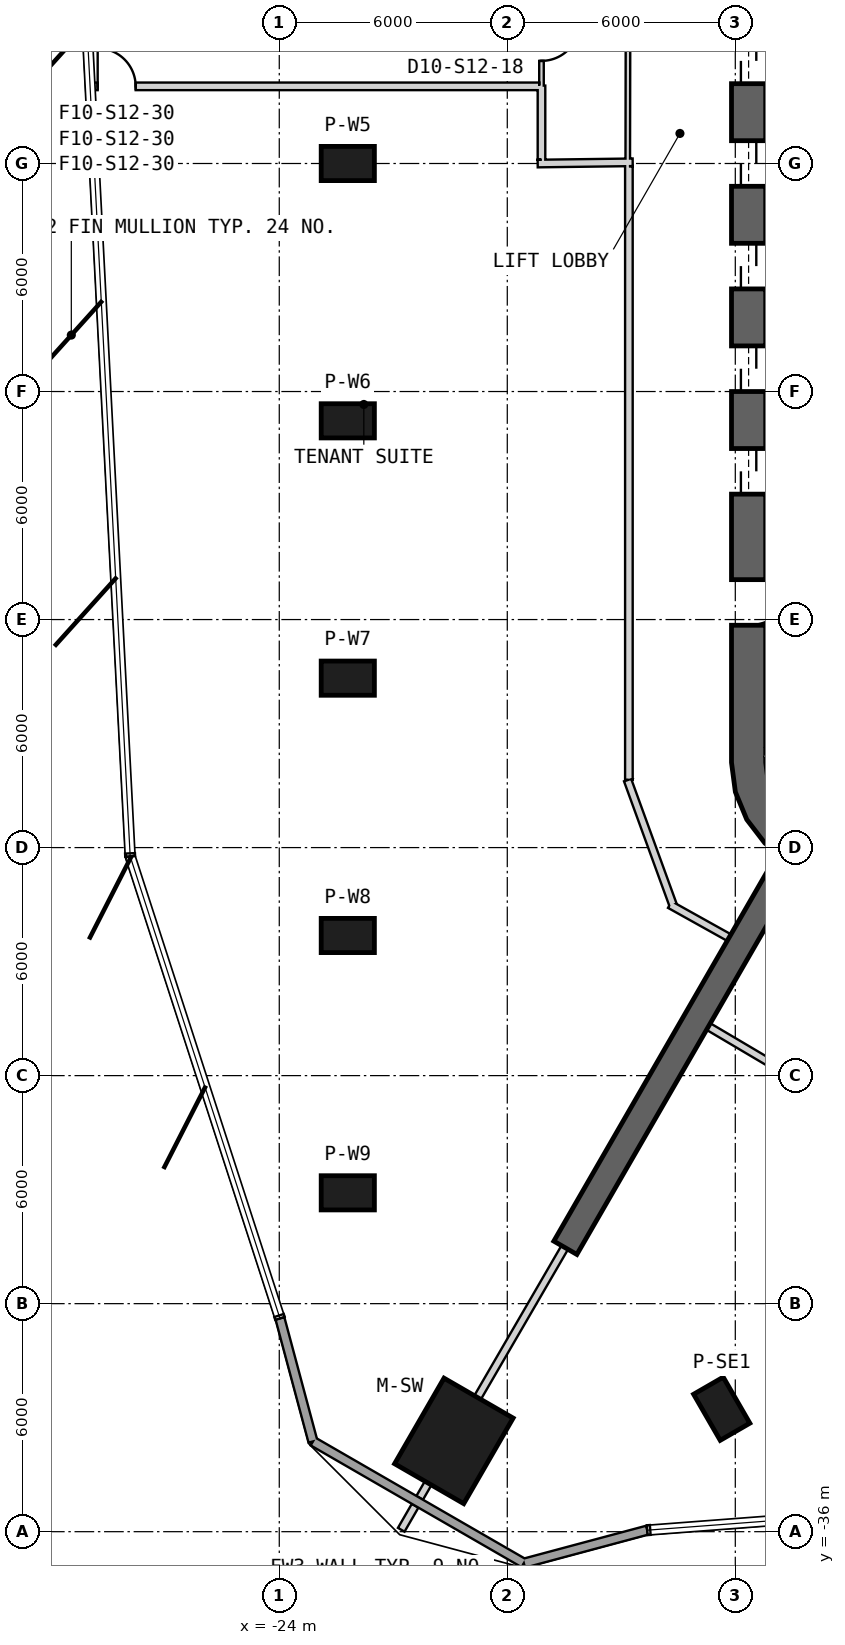
"""IFC4 building model, lengths in metres.
Left out: names, types, materials, properties, quantities, classifications, styles, units other than length and angle.
Written with IfcOpenShell. Run it as: python <this file> out.ifc"""

import sys

from ifc_helpers import new_model, si_unit, direction, frame, frame_2d, origin, origin_2d, place, context, subcontext, project, spatial, polyline, rectangle, outline, extrude, element, fill, save


model = new_model("IFC4")
c1 = context("Model", 3, precision=1e-05, world=origin(), true_north=direction((0.0, 1.0)))
c2 = subcontext(c1, "Body", "Model", "MODEL_VIEW")
j1 = project(units=[si_unit("LENGTHUNIT", "METRE"), si_unit("PLANEANGLEUNIT", "RADIAN")], contexts=[c1])
p1 = place(None, origin())
s1 = spatial("IfcSite", under=j1, at=p1, CompositionType="ELEMENT")
p2 = place(p1, origin())
s2 = spatial("IfcBuilding", under=s1, at=p2, CompositionType="ELEMENT")
p3 = place(p2, frame((0.0, 0.0, 205.2)))
s3 = spatial("IfcBuildingStorey", under=s2, at=p3, CompositionType="ELEMENT", Elevation=205.2)
p4 = place(p3, frame((-19.406, -33.611, 0.0), z_axis=(0.0, 0.0, 1.0), x_axis=(-0.5, -0.866025403784, 0.0)))
e1 = element("IfcColumn", 1, at=p4, inside=s3, PredefinedType="COLUMN", context=c2, shape_type="SweptSolid", body=[
    extrude(rectangle(XDim=2.6, YDim=2.1, at=origin_2d()), origin(), (0.0, 0.0, 1.0), 4.0),
])
for number, where, z_axis, x_axis in (
    (2, (-22.197, 0.0, 0.0), (0.0, 0.0, 1.0), (-1.0, 0.0, 0.0)),
    (3, (-22.197, -6.771, 0.0), (0.0, 0.0, 1.0), (-1.0, 0.0, 0.0)),
    (4, (-22.197, -13.542, 0.0), (0.0, 0.0, 1.0), (-1.0, 0.0, 0.0)),
    (5, (-22.197, -20.313, 0.0), (0.0, 0.0, 1.0), (-1.0, 0.0, 0.0)),
    (6, (-22.197, -27.084, 0.0), (0.0, 0.0, 1.0), (-1.0, 0.0, 0.0)),
    (7, (-12.357, -32.765, 0.0), (0.0, 0.0, 1.0), (0.5, -0.866, 0.0)),
):
    element("IfcColumn", number, at=place(p3, frame(where, z_axis=z_axis, x_axis=x_axis)), inside=s3, PredefinedType="COLUMN", context=c2, shape_type="SweptSolid", body=[
        extrude(rectangle(XDim=1.4, YDim=0.9, at=origin_2d()), origin(), (0.0, 0.0, 1.0), 4.0),
    ])
p5 = place(p3, frame((-11.65, 15.762, 0.0), z_axis=(0.0, 0.0, 1.0), x_axis=(0.0, -1.0, 0.0)))
e8 = element("IfcWall", 8, at=p5, inside=s3, PredefinedType="SHEAR", context=c2, shape_type="SweptSolid", body=[
    extrude(rectangle(XDim=31.523, YDim=0.9, at=frame_2d((15.762, 0.0))), origin(), (0.0, 0.0, 1.0), 4.0),
])
p6 = place(p5, frame((7.062, 0.0, 0.0)))
e9 = element("IfcOpeningElement", 9, at=p6, cuts=e8, PredefinedType="OPENING", context=c2, shape_type="SweptSolid", body=[
    extrude(rectangle(XDim=1.2, YDim=2.4, at=frame_2d((0.6, 1.2))), frame((0.0, 0.46, 0.0), z_axis=(0.0, -1.0, 0.0), x_axis=(1.0, 0.0, 0.0)), (0.0, 0.0, 1.0), 0.92),
])
p7 = place(p5, frame((9.762, 0.0, 0.0)))
e10 = element("IfcOpeningElement", 10, at=p7, cuts=e8, PredefinedType="OPENING", context=c2, shape_type="SweptSolid", body=[
    extrude(rectangle(XDim=1.2, YDim=2.4, at=frame_2d((0.6, 1.2))), frame((0.0, 0.46, 0.0), z_axis=(0.0, -1.0, 0.0), x_axis=(1.0, 0.0, 0.0)), (0.0, 0.0, 1.0), 0.92),
])
p8 = place(p5, frame((12.462, 0.0, 0.0)))
e11 = element("IfcOpeningElement", 11, at=p8, cuts=e8, PredefinedType="OPENING", context=c2, shape_type="SweptSolid", body=[
    extrude(rectangle(XDim=1.2, YDim=2.4, at=frame_2d((0.6, 1.2))), frame((0.0, 0.46, 0.0), z_axis=(0.0, -1.0, 0.0), x_axis=(1.0, 0.0, 0.0)), (0.0, 0.0, 1.0), 0.92),
])
p9 = place(p5, frame((15.162, 0.0, 0.0)))
e12 = element("IfcOpeningElement", 12, at=p9, cuts=e8, PredefinedType="OPENING", context=c2, shape_type="SweptSolid", body=[
    extrude(rectangle(XDim=1.2, YDim=2.4, at=frame_2d((0.6, 1.2))), frame((0.0, 0.46, 0.0), z_axis=(0.0, -1.0, 0.0), x_axis=(1.0, 0.0, 0.0)), (0.0, 0.0, 1.0), 0.92),
])
p10 = place(p5, frame((17.862, 0.0, 0.0)))
e13 = element("IfcOpeningElement", 13, at=p10, cuts=e8, PredefinedType="OPENING", context=c2, shape_type="SweptSolid", body=[
    extrude(rectangle(XDim=1.2, YDim=2.4, at=frame_2d((0.6, 1.2))), frame((0.0, 0.46, 0.0), z_axis=(0.0, -1.0, 0.0), x_axis=(1.0, 0.0, 0.0)), (0.0, 0.0, 1.0), 0.92),
])
p11 = place(p5, frame((20.562, 0.0, 0.0)))
e14 = element("IfcOpeningElement", 14, at=p11, cuts=e8, PredefinedType="OPENING", context=c2, shape_type="SweptSolid", body=[
    extrude(rectangle(XDim=1.2, YDim=2.4, at=frame_2d((0.6, 1.2))), frame((0.0, 0.46, 0.0), z_axis=(0.0, -1.0, 0.0), x_axis=(1.0, 0.0, 0.0)), (0.0, 0.0, 1.0), 0.92),
])
p12 = place(p5, frame((23.262, 0.0, 0.0)))
e15 = element("IfcOpeningElement", 15, at=p12, cuts=e8, PredefinedType="OPENING", context=c2, shape_type="SweptSolid", body=[
    extrude(rectangle(XDim=1.2, YDim=2.4, at=frame_2d((0.6, 1.2))), frame((0.0, 0.46, 0.0), z_axis=(0.0, -1.0, 0.0), x_axis=(1.0, 0.0, 0.0)), (0.0, 0.0, 1.0), 0.92),
])
p13 = place(p5, frame((3.612, 0.0, 0.0)))
e16 = element("IfcOpeningElement", 16, at=p13, cuts=e8, PredefinedType="OPENING", context=c2, shape_type="SweptSolid", body=[
    extrude(rectangle(XDim=1.2, YDim=2.4, at=frame_2d((0.6, 1.2))), frame((0.0, 0.46, 0.0), z_axis=(0.0, -1.0, 0.0), x_axis=(1.0, 0.0, 0.0)), (0.0, 0.0, 1.0), 0.92),
])
p14 = place(p5, frame((26.712, 0.0, 0.0)))
e17 = element("IfcOpeningElement", 17, at=p14, cuts=e8, PredefinedType="OPENING", context=c2, shape_type="SweptSolid", body=[
    extrude(rectangle(XDim=1.2, YDim=2.4, at=frame_2d((0.6, 1.2))), frame((0.0, 0.46, 0.0), z_axis=(0.0, -1.0, 0.0), x_axis=(1.0, 0.0, 0.0)), (0.0, 0.0, 1.0), 0.92),
])
p15 = place(p3, origin())
e18 = element("IfcWall", 18, at=p15, inside=s3, PredefinedType="SHEAR", context=c2, shape_type="SweptSolid", body=[
    extrude(outline(polyline([(-12.1, -15.762), (-11.998, -16.538), (-11.698, -17.262), (-11.221, -17.883), (-10.6, -18.36), (-9.876, -18.659), (-9.1, -18.762), (-8.323, -18.659), (-7.6, -18.36), (-8.05, -17.58), (-8.556, -17.79), (-9.1, -17.862), (-9.644, -17.79), (-10.15, -17.58), (-10.585, -17.247), (-10.919, -16.812), (-11.128, -16.305), (-11.2, -15.762), (-12.1, -15.762)])), origin(), (0.0, 0.0, 1.0), 4.0),
])
p16 = place(p3, frame((-10.575, -18.316, 0.0), z_axis=(0.0, 0.0, 1.0), x_axis=(-0.499999598486, -0.866025635599, 0.0)))
e19 = element("IfcWall", 19, at=p16, inside=s3, PredefinedType="SHEAR", context=c2, shape_type="SweptSolid", body=[
    extrude(rectangle(XDim=11.794, YDim=0.7, at=frame_2d((5.897, 0.0))), origin(), (0.0, 0.0, 1.0), 4.0),
])
p17 = place(p3, frame((-23.982, -30.388, 0.0), z_axis=(0.0, 0.0, 1.0), x_axis=(0.258863474337, -0.965913920416, 0.0)))
e20 = element("IfcWall", 20, at=p17, inside=s3, PredefinedType="SOLIDWALL", context=c2, shape_type="SweptSolid", body=[
    extrude(rectangle(XDim=3.353, YDim=0.24, at=frame_2d((1.676, 0.0))), origin(), (0.0, 0.0, 1.0), 3.7),
])
p18 = place(p3, frame((-23.114, -33.626, 0.0), z_axis=(0.0, 0.0, 1.0), x_axis=(0.86602381473, -0.500002752313, 0.0)))
e21 = element("IfcWall", 21, at=p18, inside=s3, PredefinedType="SOLIDWALL", context=c2, shape_type="SweptSolid", body=[
    extrude(rectangle(XDim=6.409, YDim=0.24, at=frame_2d((3.204, 0.0))), origin(), (0.0, 0.0, 1.0), 3.7),
])
p19 = place(p3, frame((-17.564, -36.831, 0.0), z_axis=(0.0, 0.0, 1.0), x_axis=(0.965919514081, 0.258842601434, 0.0)))
e22 = element("IfcWall", 22, at=p19, inside=s3, PredefinedType="SOLIDWALL", context=c2, shape_type="SweptSolid", body=[
    extrude(rectangle(XDim=3.361, YDim=0.24, at=frame_2d((1.68, 0.0))), origin(), (0.0, 0.0, 1.0), 3.7),
])
p20 = place(p3, frame((-11.282, -15.541, -0.3), z_axis=(0.0, 0.0, 1.0), x_axis=(0.866000483506, -0.500043160704, 0.0)))
e23 = element("IfcWall", 23, at=p20, inside=s3, PredefinedType="SHEAR", context=c2, shape_type="SweptSolid", body=[
    extrude(rectangle(XDim=3.8, YDim=0.2, at=frame_2d((1.9, 0.0))), origin(), (0.0, 0.0, 1.0), 4.0),
])
p21 = place(p3, frame((-7.196, -8.663, -0.3), z_axis=(0.0, 0.0, 1.0), x_axis=(-0.499997992926, -0.866026562566, 0.0)))
e24 = element("IfcWall", 24, at=p21, inside=s3, PredefinedType="SHEAR", context=c2, shape_type="SweptSolid", body=[
    extrude(rectangle(XDim=7.9, YDim=0.2, at=frame_2d((3.95, 0.0))), origin(), (0.0, 0.0, 1.0), 4.0),
])
p22 = place(p3, frame((-14.8, 16.257, 0.0), z_axis=(0.0, 0.0, 1.0), x_axis=(-0.001847148781, -0.999998294019, 0.0)))
e25 = element("IfcWall", 25, at=p22, inside=s3, PredefinedType="PARTITIONING", context=c2, shape_type="SweptSolid", body=[
    extrude(rectangle(XDim=16.257, YDim=0.12, at=frame_2d((8.128, 0.0))), origin(), (0.0, 0.0, 1.0), 2.88),
])
p23 = place(p22, frame((7.629, 0.0, 0.0)))
e26 = element("IfcOpeningElement", 26, at=p23, cuts=e25, PredefinedType="OPENING", context=c2, shape_type="SweptSolid", body=[
    extrude(rectangle(XDim=1.0, YDim=2.1, at=frame_2d((0.5, 1.05))), frame((0.0, 0.07, 0.0), z_axis=(0.0, -1.0, 0.0), x_axis=(1.0, 0.0, 0.0)), (0.0, 0.0, 1.0), 0.14),
])
p24 = place(p3, frame((-17.1, 4.35, 0.0), z_axis=(0.0, 0.0, 1.0), x_axis=(0.0, -1.0, 0.0)))
e27 = element("IfcWall", 27, at=p24, inside=s3, PredefinedType="PARTITIONING", context=c2, shape_type="SweptSolid", body=[
    extrude(rectangle(XDim=2.3, YDim=0.12, at=frame_2d((1.15, 0.0))), origin(), (0.0, 0.0, 1.0), 3.7),
])
p25 = place(p24, frame((0.65, 0.0, 0.0)))
e28 = element("IfcOpeningElement", 28, at=p25, cuts=e27, PredefinedType="OPENING", context=c2, shape_type="SweptSolid", body=[
    extrude(rectangle(XDim=1.0, YDim=2.1, at=frame_2d((0.5, 1.05))), frame((0.0, 0.07, 0.0), z_axis=(0.0, -1.0, 0.0), x_axis=(1.0, 0.0, 0.0)), (0.0, 0.0, 1.0), 0.14),
])
p26 = place(p3, frame((-17.2, -0.001, 0.0), z_axis=(0.0, 0.0, 1.0), x_axis=(0.999915662945, 0.012987185857, 0.0)))
e29 = element("IfcWall", 29, at=p26, inside=s3, PredefinedType="PARTITIONING", context=c2, shape_type="SweptSolid", body=[
    extrude(rectangle(XDim=2.5, YDim=0.2, at=frame_2d((1.25, 0.0))), origin(), (0.0, 0.0, 1.0), 3.07),
])
p27 = place(p3, frame((-17.1, 2.05, 0.0), z_axis=(0.0, 0.0, 1.0), x_axis=(0.0, -1.0, 0.0)))
e30 = element("IfcWall", 30, at=p27, inside=s3, PredefinedType="PARTITIONING", context=c2, shape_type="SweptSolid", body=[
    extrude(rectangle(XDim=1.95, YDim=0.2, at=frame_2d((0.975, 0.0))), origin(), (0.0, 0.0, 1.0), 3.07),
])
p28 = place(p3, frame((-13.722, -19.499, 0.0), z_axis=(0.0, 0.0, 1.0), x_axis=(0.873381780332, -0.487036205824, 0.0)))
e31 = element("IfcWall", 31, at=p28, inside=s3, PredefinedType="PARTITIONING", context=c2, shape_type="SweptSolid", body=[
    extrude(rectangle(XDim=1.785, YDim=0.2, at=frame_2d((0.892, 0.0))), origin(), (0.0, 0.0, 1.0), 3.7),
])
p29 = place(p3, frame((-14.834, -16.223, 0.0), z_axis=(0.0, 0.0, 1.0), x_axis=(0.342017717312, -0.939693503779, 0.0)))
e32 = element("IfcWall", 32, at=p29, inside=s3, PredefinedType="PARTITIONING", context=c2, shape_type="SweptSolid", body=[
    extrude(rectangle(XDim=3.497, YDim=0.2, at=frame_2d((1.749, 0.0))), origin(), (0.0, 0.0, 1.0), 2.78),
])
p30 = place(p3, frame((-14.8, -0.07, 0.0), z_axis=(0.0, 0.0, 1.0), x_axis=(0.0, -1.0, 0.0)))
e33 = element("IfcWall", 33, at=p30, inside=s3, PredefinedType="PARTITIONING", context=c2, shape_type="SweptSolid", body=[
    extrude(rectangle(XDim=16.147, YDim=0.2, at=frame_2d((8.073, 0.0))), origin(), (0.0, 0.0, 1.0), 2.88),
])
p31 = place(p3, frame((-12.707, -22.709, 0.0), z_axis=(0.0, 0.0, 1.0), x_axis=(0.860754387085, -0.509020515415, 0.0)))
e34 = element("IfcWall", 34, at=p31, inside=s3, PredefinedType="PARTITIONING", context=c2, shape_type="SweptSolid", body=[
    extrude(rectangle(XDim=2.457, YDim=0.2, at=frame_2d((1.229, 0.0))), origin(), (0.0, 0.0, 1.0), 3.7),
])
p32 = place(p3, frame((-28.979, 2.03, 0.0), z_axis=(0.0, 0.0, 1.0), x_axis=(1.0, 0.0, 0.0)))
e35 = element("IfcWall", 35, at=p32, inside=s3, PredefinedType="PARTITIONING", context=c2, shape_type="SweptSolid", body=[
    extrude(rectangle(XDim=11.819, YDim=0.2, at=frame_2d((5.909, 0.0))), origin(), (0.0, 0.0, 1.0), 3.7),
])
p33 = place(p32, frame((0.2, 0.0, 0.0)))
e36 = element("IfcOpeningElement", 36, at=p33, cuts=e35, PredefinedType="OPENING", context=c2, shape_type="SweptSolid", body=[
    extrude(rectangle(XDim=1.0, YDim=2.1, at=frame_2d((0.5, 1.05))), frame((0.0, 0.11, 0.0), z_axis=(0.0, -1.0, 0.0), x_axis=(1.0, 0.0, 0.0)), (0.0, 0.0, 1.0), 0.22),
])
p34 = place(p3, frame((-20.79, -35.95, 0.0), z_axis=(0.0, 0.0, 1.0), x_axis=(0.499876722092, 0.86609656662, 0.0)))
e37 = element("IfcWall", 37, at=p34, inside=s3, PredefinedType="PARTITIONING", context=c2, shape_type="SweptSolid", body=[
    extrude(rectangle(XDim=0.731, YDim=0.2, at=frame_2d((0.365, 0.0))), origin(), (0.0, 0.0, 1.0), 3.7),
])
p35 = place(p3, frame((-20.305, -35.109, 0.0), z_axis=(0.0, 0.0, 1.0), x_axis=(0.500132045864, 0.865949153646, 0.0)))
e38 = element("IfcWall", 38, at=p35, inside=s3, PredefinedType="PARTITIONING", context=c2, shape_type="SweptSolid", body=[
    extrude(rectangle(XDim=0.447, YDim=0.2, at=frame_2d((0.224, 0.0))), origin(), (0.0, 0.0, 1.0), 3.7),
])
p36 = place(p3, frame((-18.781, -32.47, 0.0), z_axis=(0.0, 0.0, 1.0), x_axis=(0.502274788288, 0.864708064638, 0.0)))
e39 = element("IfcWall", 39, at=p36, inside=s3, PredefinedType="PARTITIONING", context=c2, shape_type="SweptSolid", body=[
    extrude(rectangle(XDim=4.567, YDim=0.2, at=frame_2d((2.284, 0.0))), origin(), (0.0, 0.0, 1.0), 3.27),
])
p37 = place(p25, origin())
e40 = element("IfcDoor", 40, at=p37, inside=s3, OperationType="SINGLE_SWING_LEFT", PredefinedType="NOTDEFINED", context=c2, shape_type="SweptSolid", body=[
    extrude(rectangle(XDim=1.0, YDim=2.1, at=frame_2d((0.5, 1.05))), frame((0.0, 0.025, 0.0), z_axis=(0.0, -1.0, 0.0), x_axis=(1.0, 0.0, 0.0)), (0.0, 0.0, 1.0), 0.05),
])
fill(e28, e40)
p38 = place(p33, origin())
e41 = element("IfcDoor", 41, at=p38, inside=s3, OperationType="SINGLE_SWING_RIGHT", PredefinedType="USERDEFINED", context=c2, shape_type="SweptSolid", body=[
    extrude(rectangle(XDim=1.0, YDim=2.1, at=frame_2d((0.5, 1.05))), frame((0.0, 0.025, 0.0), z_axis=(0.0, -1.0, 0.0), x_axis=(1.0, 0.0, 0.0)), (0.0, 0.0, 1.0), 0.05),
])
fill(e36, e41)
p39 = place(p8, origin())
e42 = element("IfcDoor", 42, at=p39, inside=s3, OperationType="SLIDING_TO_LEFT", PredefinedType="USERDEFINED", context=c2, shape_type="SweptSolid", body=[
    extrude(rectangle(XDim=1.2, YDim=2.4, at=frame_2d((0.6, 1.2))), frame((0.0, 0.025, 0.0), z_axis=(0.0, -1.0, 0.0), x_axis=(1.0, 0.0, 0.0)), (0.0, 0.0, 1.0), 0.05),
])
fill(e11, e42)
p40 = place(p9, origin())
e43 = element("IfcDoor", 43, at=p40, inside=s3, OperationType="SLIDING_TO_LEFT", PredefinedType="USERDEFINED", context=c2, shape_type="SweptSolid", body=[
    extrude(rectangle(XDim=1.2, YDim=2.4, at=frame_2d((0.6, 1.2))), frame((0.0, 0.025, 0.0), z_axis=(0.0, -1.0, 0.0), x_axis=(1.0, 0.0, 0.0)), (0.0, 0.0, 1.0), 0.05),
])
fill(e12, e43)
p41 = place(p10, origin())
e44 = element("IfcDoor", 44, at=p41, inside=s3, OperationType="SLIDING_TO_LEFT", PredefinedType="USERDEFINED", context=c2, shape_type="SweptSolid", body=[
    extrude(rectangle(XDim=1.2, YDim=2.4, at=frame_2d((0.6, 1.2))), frame((0.0, 0.025, 0.0), z_axis=(0.0, -1.0, 0.0), x_axis=(1.0, 0.0, 0.0)), (0.0, 0.0, 1.0), 0.05),
])
fill(e13, e44)
p42 = place(p11, origin())
e45 = element("IfcDoor", 45, at=p42, inside=s3, OperationType="SLIDING_TO_LEFT", PredefinedType="USERDEFINED", context=c2, shape_type="SweptSolid", body=[
    extrude(rectangle(XDim=1.2, YDim=2.4, at=frame_2d((0.6, 1.2))), frame((0.0, 0.025, 0.0), z_axis=(0.0, -1.0, 0.0), x_axis=(1.0, 0.0, 0.0)), (0.0, 0.0, 1.0), 0.05),
])
fill(e14, e45)
p43 = place(p12, origin())
e46 = element("IfcDoor", 46, at=p43, inside=s3, OperationType="SLIDING_TO_LEFT", PredefinedType="USERDEFINED", context=c2, shape_type="SweptSolid", body=[
    extrude(rectangle(XDim=1.2, YDim=2.4, at=frame_2d((0.6, 1.2))), frame((0.0, 0.025, 0.0), z_axis=(0.0, -1.0, 0.0), x_axis=(1.0, 0.0, 0.0)), (0.0, 0.0, 1.0), 0.05),
])
fill(e15, e46)
p44 = place(p14, origin())
e47 = element("IfcDoor", 47, at=p44, inside=s3, OperationType="SINGLE_SWING_RIGHT", PredefinedType="USERDEFINED", context=c2, shape_type="SweptSolid", body=[
    extrude(rectangle(XDim=1.2, YDim=2.4, at=frame_2d((0.6, 1.2))), frame((0.0, 0.025, 0.0), z_axis=(0.0, -1.0, 0.0), x_axis=(1.0, 0.0, 0.0)), (0.0, 0.0, 1.0), 0.05),
])
fill(e17, e47)
save(model, sys.argv[1])
